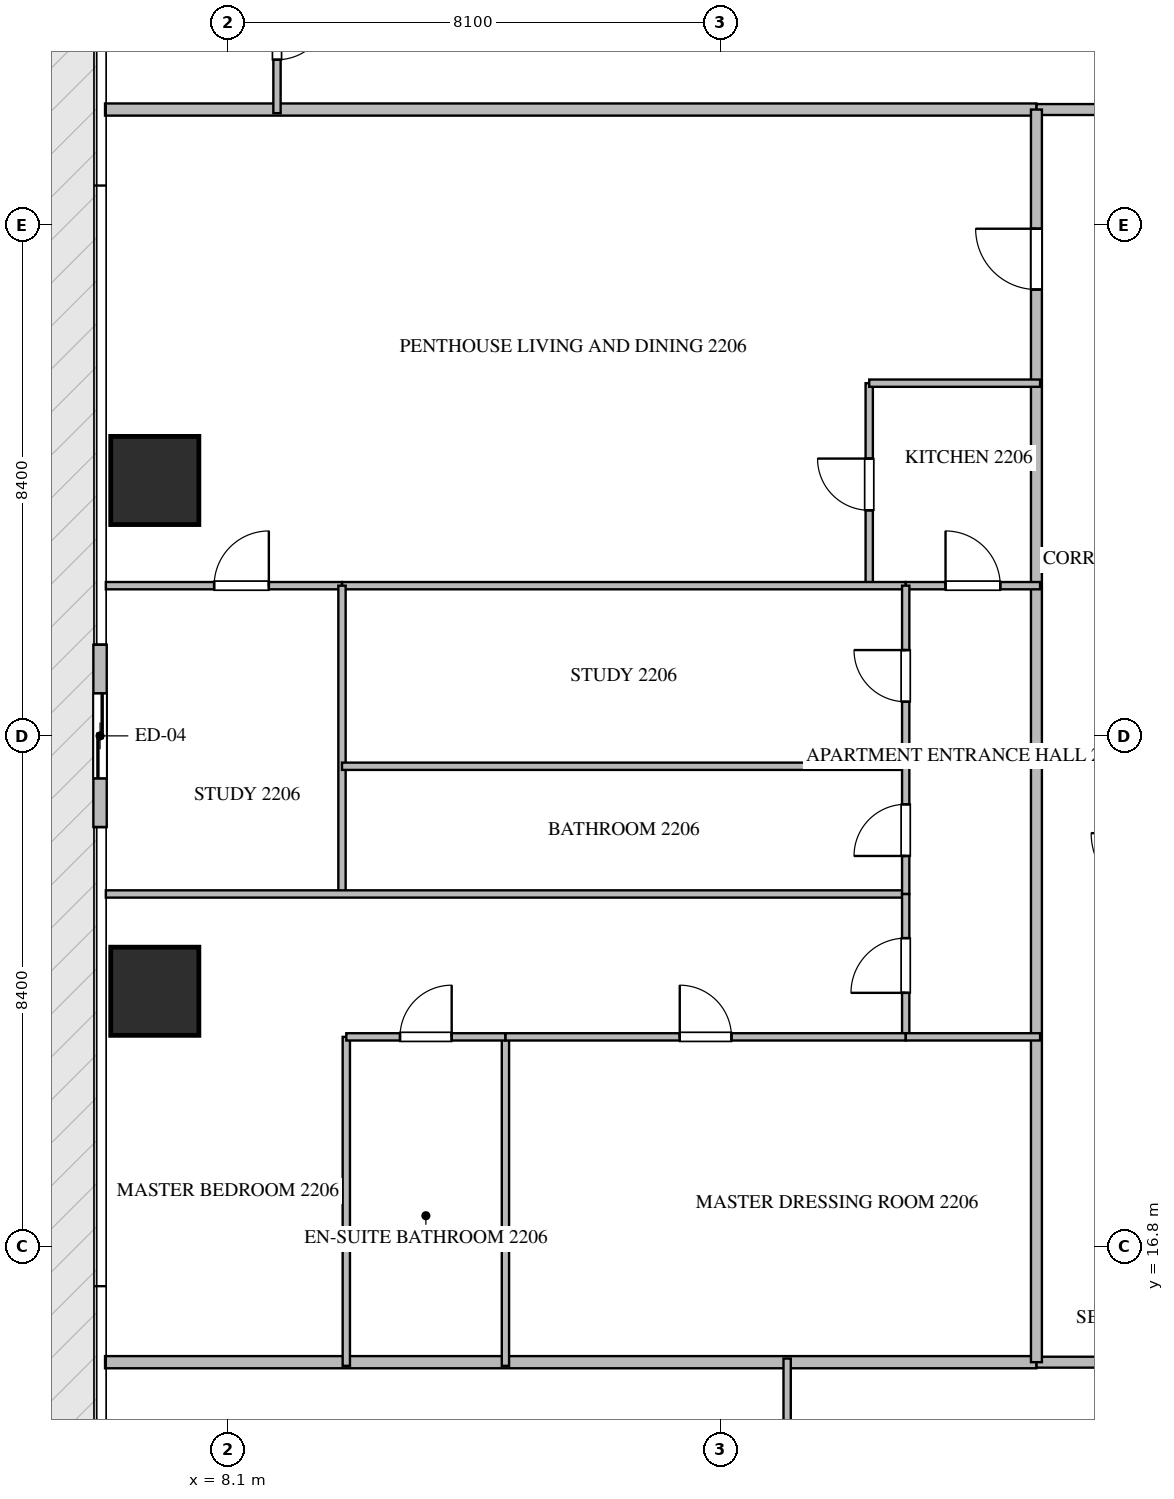
"""IFC4 building model, lengths in metres.
Left out: names, types, materials, properties, quantities, classifications, styles, units other than length and angle.
Written with IfcOpenShell. Run it as: python <this file> out.ifc"""

import sys

from ifc_helpers import new_model, si_unit, direction, frame, frame_2d, origin, origin_2d, place, context, subcontext, project, spatial, rectangle, extrude, source, transform, mapped, element, fill, save


model = new_model("IFC4")
c1 = context("Model", 3, precision=1e-05, world=origin(), true_north=direction((0.0, 1.0)))
c2 = subcontext(c1, "Body", "Model", "MODEL_VIEW")
j1 = project(units=[si_unit("LENGTHUNIT", "METRE"), si_unit("PLANEANGLEUNIT", "RADIAN")], contexts=[c1])
p1 = place(None, origin())
s1 = spatial("IfcSite", under=j1, at=p1, CompositionType="ELEMENT")
p2 = place(p1, origin())
s2 = spatial("IfcBuilding", under=s1, at=p2, CompositionType="ELEMENT")
p3 = place(p2, frame((0.0, 0.0, 90.45)))
s3 = spatial("IfcBuildingStorey", under=s2, at=p3, CompositionType="ELEMENT", Elevation=90.45)
m1 = source(origin(), c2, "Body", "SweptSolid", [
    extrude(rectangle(XDim=1.45, YDim=1.45, at=origin_2d()), origin(), (0.0, 0.0, 1.0), 3.75),
])
for number, where, z_axis, x_axis in (
    (1, (6.9, 21.0, -0.26), (0.0, 0.0, 1.0), (1.0, 0.0, 0.0)),
    (2, (6.9, 29.4, -0.26), (0.0, 0.0, 1.0), (1.0, 0.0, 0.0)),
):
    element("IfcColumn", number, at=place(p3, frame(where, z_axis=z_axis, x_axis=x_axis)), inside=s3, PredefinedType="COLUMN", context=c2, shape_type="MappedRepresentation", body=[
        mapped(m1, transform((0.0, 0.0, 0.0), scale=1.0)),
    ])
p4 = place(p3, frame((6.0, 26.7, 0.0), z_axis=(0.0, 0.0, 1.0), x_axis=(0.0, -1.0, 0.0)))
e3 = element("IfcWall", 3, at=p4, inside=s3, PredefinedType="ELEMENTEDWALL", context=c2, shape_type="SweptSolid", body=[
    extrude(rectangle(XDim=3.0, YDim=0.22, at=frame_2d((1.5, 0.0))), origin(), (0.0, 0.0, 1.0), 3.475),
])
p5 = place(p4, frame((0.8, 0.0, 0.0)))
e4 = element("IfcOpeningElement", 4, at=p5, cuts=e3, PredefinedType="OPENING", context=c2, shape_type="SweptSolid", body=[
    extrude(rectangle(XDim=1.4, YDim=2.25, at=frame_2d((0.7, 1.125))), frame((0.0, 0.12, 0.0), z_axis=(0.0, -1.0, 0.0), x_axis=(1.0, 0.0, 0.0)), (0.0, 0.0, 1.0), 0.24),
])
for number, where, z_axis, x_axis in (
    (5, (6.082, 14.9, 0.0), (0.0, 0.0, 1.0), (1.0, 0.0, 0.0)),
    (6, (6.082, 35.5, 0.0), (0.0, 0.0, 1.0), (1.0, 0.0, 0.0)),
):
    element("IfcWall", number, at=place(p3, frame(where, z_axis=z_axis, x_axis=x_axis)), inside=s3, PredefinedType="PARTITIONING", context=c2, shape_type="SweptSolid", body=[
        extrude(rectangle(XDim=15.318, YDim=0.2, at=frame_2d((7.659, 0.0))), origin(), (0.0, 0.0, 1.0), 3.49),
    ])
p6 = place(p3, frame((21.402, 14.9, 0.0), z_axis=(0.0, 0.0, 1.0), x_axis=(1.0, 0.0, 0.0)))
e7 = element("IfcWall", 7, at=p6, inside=s3, PredefinedType="PARTITIONING", context=c2, shape_type="SweptSolid", body=[
    extrude(rectangle(XDim=21.996, YDim=0.18, at=frame_2d((10.998, 0.0))), origin(), (0.0, 0.0, 1.0), 3.49),
])
p7 = place(p6, frame((7.202, 0.0, 0.0)))
e8 = element("IfcOpeningElement", 8, at=p7, cuts=e7, PredefinedType="OPENING", context=c2, shape_type="SweptSolid", body=[
    extrude(rectangle(XDim=1.0, YDim=2.15, at=frame_2d((0.5, 1.075))), frame((0.0, 0.1, 0.0), z_axis=(0.0, -1.0, 0.0), x_axis=(1.0, 0.0, 0.0)), (0.0, 0.0, 1.0), 0.2),
])
p8 = place(p3, frame((21.402, 35.5, 0.0), z_axis=(0.0, 0.0, 1.0), x_axis=(1.0, 0.0, 0.0)))
e9 = element("IfcWall", 9, at=p8, inside=s3, PredefinedType="PARTITIONING", context=c2, shape_type="SweptSolid", body=[
    extrude(rectangle(XDim=21.996, YDim=0.18, at=frame_2d((10.998, 0.0))), origin(), (0.0, 0.0, 1.0), 3.49),
])
p9 = place(p8, frame((1.96, 0.0, 0.0)))
e10 = element("IfcOpeningElement", 10, at=p9, cuts=e9, PredefinedType="OPENING", context=c2, shape_type="SweptSolid", body=[
    extrude(rectangle(XDim=1.0, YDim=2.15, at=frame_2d((0.5, 1.075))), frame((0.0, 0.1, 0.0), z_axis=(0.0, -1.0, 0.0), x_axis=(1.0, 0.0, 0.0)), (0.0, 0.0, 1.0), 0.2),
])
p10 = place(p8, frame((5.249, 0.0, 0.0)))
e11 = element("IfcOpeningElement", 11, at=p10, cuts=e9, PredefinedType="OPENING", context=c2, shape_type="SweptSolid", body=[
    extrude(rectangle(XDim=1.0, YDim=2.15, at=frame_2d((0.5, 1.075))), frame((0.0, 0.1, 0.0), z_axis=(0.0, -1.0, 0.0), x_axis=(1.0, 0.0, 0.0)), (0.0, 0.0, 1.0), 0.2),
])
p11 = place(p8, frame((11.653, 0.0, 0.0)))
e12 = element("IfcOpeningElement", 12, at=p11, cuts=e9, PredefinedType="OPENING", context=c2, shape_type="SweptSolid", body=[
    extrude(rectangle(XDim=1.0, YDim=2.15, at=frame_2d((0.5, 1.075))), frame((0.0, 0.1, 0.0), z_axis=(0.0, -1.0, 0.0), x_axis=(1.0, 0.0, 0.0)), (0.0, 0.0, 1.0), 0.2),
])
p12 = place(p8, frame((18.896, 0.0, 0.0)))
e13 = element("IfcOpeningElement", 13, at=p12, cuts=e9, PredefinedType="OPENING", context=c2, shape_type="SweptSolid", body=[
    extrude(rectangle(XDim=1.0, YDim=2.15, at=frame_2d((0.5, 1.075))), frame((0.0, 0.1, 0.0), z_axis=(0.0, -1.0, 0.0), x_axis=(1.0, 0.0, 0.0)), (0.0, 0.0, 1.0), 0.2),
])
p13 = place(p3, frame((21.4, 14.9, 0.0), z_axis=(0.0, 0.0, 1.0), x_axis=(0.0, 1.0, 0.0)))
e14 = element("IfcWall", 14, at=p13, inside=s3, PredefinedType="PARTITIONING", context=c2, shape_type="SweptSolid", body=[
    extrude(rectangle(XDim=20.6, YDim=0.18, at=frame_2d((10.3, 0.0))), origin(), (0.0, 0.0, 1.0), 3.49),
])
p14 = place(p13, frame((17.64, 0.0, 0.0)))
e15 = element("IfcOpeningElement", 15, at=p14, cuts=e14, PredefinedType="OPENING", context=c2, shape_type="SweptSolid", body=[
    extrude(rectangle(XDim=1.0, YDim=2.15, at=frame_2d((0.5, 1.075))), frame((0.0, 0.1, 0.0), z_axis=(0.0, -1.0, 0.0), x_axis=(1.0, 0.0, 0.0)), (0.0, 0.0, 1.0), 0.2),
])
p15 = place(p3, frame((17.3, 12.752, 0.0), z_axis=(0.0, 0.0, 1.0), x_axis=(0.0, 1.0, 0.0)))
e16 = element("IfcWall", 16, at=p15, inside=s3, PredefinedType="PARTITIONING", context=c2, shape_type="SweptSolid", body=[
    extrude(rectangle(XDim=2.208, YDim=0.12, at=frame_2d((1.104, 0.0))), origin(), (0.0, 0.0, 1.0), 3.49),
])
p16 = place(p3, frame((8.91, 38.048, 0.0), z_axis=(0.0, 0.0, 1.0), x_axis=(0.0, -1.0, 0.0)))
e17 = element("IfcWall", 17, at=p16, inside=s3, PredefinedType="PARTITIONING", context=c2, shape_type="SweptSolid", body=[
    extrude(rectangle(XDim=2.608, YDim=0.12, at=frame_2d((1.304, 0.0))), origin(), (0.0, 0.0, 1.0), 3.49),
])
p17 = place(p16, frame((0.879, 0.0, 0.0)))
e18 = element("IfcOpeningElement", 18, at=p17, cuts=e17, PredefinedType="OPENING", context=c2, shape_type="SweptSolid", body=[
    extrude(rectangle(XDim=0.85, YDim=2.1, at=frame_2d((0.425, 1.05))), frame((0.0, 0.07, 0.0), z_axis=(0.0, -1.0, 0.0), x_axis=(1.0, 0.0, 0.0)), (0.0, 0.0, 1.0), 0.14),
])
p18 = place(p3, frame((18.65, 27.67, 0.0), z_axis=(0.0, 0.0, 1.0), x_axis=(0.0, 1.0, 0.0)))
e19 = element("IfcWall", 19, at=p18, inside=s3, PredefinedType="PARTITIONING", context=c2, shape_type="SweptSolid", body=[
    extrude(rectangle(XDim=3.33, YDim=0.12, at=frame_2d((1.665, 0.0))), origin(), (0.0, 0.0, 1.0), 3.49),
])
p19 = place(p18, frame((1.24, 0.0, 0.0)))
e20 = element("IfcOpeningElement", 20, at=p19, cuts=e19, PredefinedType="OPENING", context=c2, shape_type="SweptSolid", body=[
    extrude(rectangle(XDim=0.85, YDim=2.1, at=frame_2d((0.425, 1.05))), frame((0.0, 0.07, 0.0), z_axis=(0.0, -1.0, 0.0), x_axis=(1.0, 0.0, 0.0)), (0.0, 0.0, 1.0), 0.14),
])
p20 = place(p3, frame((18.65, 31.0, 0.0), z_axis=(0.0, 0.0, 1.0), x_axis=(1.0, 0.0, 0.0)))
e21 = element("IfcWall", 21, at=p20, inside=s3, PredefinedType="PARTITIONING", context=c2, shape_type="SweptSolid", body=[
    extrude(rectangle(XDim=2.81, YDim=0.12, at=frame_2d((1.405, 0.0))), origin(), (0.0, 0.0, 1.0), 3.49),
])
p21 = place(p3, frame((19.25, 27.67, 0.0), z_axis=(0.0, 0.0, 1.0), x_axis=(1.0, 0.0, 0.0)))
e22 = element("IfcWall", 22, at=p21, inside=s3, PredefinedType="PARTITIONING", context=c2, shape_type="SweptSolid", body=[
    extrude(rectangle(XDim=2.21, YDim=0.12, at=frame_2d((1.105, 0.0))), origin(), (0.0, 0.0, 1.0), 3.49),
])
p22 = place(p21, frame((0.655, 0.0, 0.0)))
e23 = element("IfcOpeningElement", 23, at=p22, cuts=e22, PredefinedType="OPENING", context=c2, shape_type="SweptSolid", body=[
    extrude(rectangle(XDim=0.9, YDim=2.1, at=frame_2d((0.45, 1.05))), frame((0.0, 0.07, 0.0), z_axis=(0.0, -1.0, 0.0), x_axis=(1.0, 0.0, 0.0)), (0.0, 0.0, 1.0), 0.14),
])
p23 = place(p3, frame((6.095, 27.67, 0.0), z_axis=(0.0, 0.0, 1.0), x_axis=(1.0, 0.0, 0.0)))
e24 = element("IfcWall", 24, at=p23, inside=s3, PredefinedType="PARTITIONING", context=c2, shape_type="SweptSolid", body=[
    extrude(rectangle(XDim=3.884, YDim=0.12, at=frame_2d((1.942, 0.0))), origin(), (0.0, 0.0, 1.0), 3.49),
])
p24 = place(p23, frame((1.781, 0.0, 0.0)))
e25 = element("IfcOpeningElement", 25, at=p24, cuts=e24, PredefinedType="OPENING", context=c2, shape_type="SweptSolid", body=[
    extrude(rectangle(XDim=0.9, YDim=2.1, at=frame_2d((0.45, 1.05))), frame((0.0, 0.07, 0.0), z_axis=(0.0, -1.0, 0.0), x_axis=(1.0, 0.0, 0.0)), (0.0, 0.0, 1.0), 0.14),
])
p25 = place(p3, frame((9.981, 27.67, 0.0), z_axis=(0.0, 0.0, 1.0), x_axis=(1.0, 0.0, 0.0)))
e26 = element("IfcWall", 26, at=p25, inside=s3, PredefinedType="PARTITIONING", context=c2, shape_type="SweptSolid", body=[
    extrude(rectangle(XDim=9.267, YDim=0.12, at=frame_2d((4.634, 0.0))), origin(), (0.0, 0.0, 1.0), 3.49),
])
p26 = place(p3, frame((9.979, 22.6, 0.0), z_axis=(0.0, 0.0, 1.0), x_axis=(0.0, 1.0, 0.0)))
e27 = element("IfcWall", 27, at=p26, inside=s3, PredefinedType="PARTITIONING", context=c2, shape_type="SweptSolid", body=[
    extrude(rectangle(XDim=5.07, YDim=0.12, at=frame_2d((2.535, 0.0))), origin(), (0.0, 0.0, 1.0), 3.49),
])
p27 = place(p3, frame((6.095, 22.6, 0.0), z_axis=(0.0, 0.0, 1.0), x_axis=(1.0, 0.0, 0.0)))
e28 = element("IfcWall", 28, at=p27, inside=s3, PredefinedType="PARTITIONING", context=c2, shape_type="SweptSolid", body=[
    extrude(rectangle(XDim=13.155, YDim=0.12, at=frame_2d((6.578, 0.0))), origin(), (0.0, 0.0, 1.0), 3.49),
])
p28 = place(p3, frame((9.979, 24.7, 0.0), z_axis=(0.0, 0.0, 1.0), x_axis=(1.0, 0.0, 0.0)))
e29 = element("IfcWall", 29, at=p28, inside=s3, PredefinedType="PARTITIONING", context=c2, shape_type="SweptSolid", body=[
    extrude(rectangle(XDim=9.271, YDim=0.12, at=frame_2d((4.635, 0.0))), origin(), (0.0, 0.0, 1.0), 3.49),
])
p29 = place(p3, frame((19.25, 22.6, 0.0), z_axis=(0.0, 0.0, 1.0), x_axis=(0.0, 1.0, 0.0)))
e30 = element("IfcWall", 30, at=p29, inside=s3, PredefinedType="PARTITIONING", context=c2, shape_type="SweptSolid", body=[
    extrude(rectangle(XDim=2.1, YDim=0.12, at=frame_2d((1.05, 0.0))), origin(), (0.0, 0.0, 1.0), 3.49),
])
p30 = place(p29, frame((0.625, 0.0, 0.0)))
e31 = element("IfcOpeningElement", 31, at=p30, cuts=e30, PredefinedType="OPENING", context=c2, shape_type="SweptSolid", body=[
    extrude(rectangle(XDim=0.85, YDim=2.1, at=frame_2d((0.425, 1.05))), frame((0.0, 0.07, 0.0), z_axis=(0.0, -1.0, 0.0), x_axis=(1.0, 0.0, 0.0)), (0.0, 0.0, 1.0), 0.14),
])
p31 = place(p3, frame((19.25, 24.702, 0.0), z_axis=(0.0, 0.0, 1.0), x_axis=(0.0, 1.0, 0.0)))
e32 = element("IfcWall", 32, at=p31, inside=s3, PredefinedType="PARTITIONING", context=c2, shape_type="SweptSolid", body=[
    extrude(rectangle(XDim=2.968, YDim=0.12, at=frame_2d((1.484, 0.0))), origin(), (0.0, 0.0, 1.0), 3.49),
])
p32 = place(p31, frame((1.059, 0.0, 0.0)))
e33 = element("IfcOpeningElement", 33, at=p32, cuts=e32, PredefinedType="OPENING", context=c2, shape_type="SweptSolid", body=[
    extrude(rectangle(XDim=0.85, YDim=2.1, at=frame_2d((0.425, 1.05))), frame((0.0, 0.07, 0.0), z_axis=(0.0, -1.0, 0.0), x_axis=(1.0, 0.0, 0.0)), (0.0, 0.0, 1.0), 0.14),
])
p33 = place(p3, frame((19.25, 20.25, 0.0), z_axis=(0.0, 0.0, 1.0), x_axis=(0.0, 1.0, 0.0)))
e34 = element("IfcWall", 34, at=p33, inside=s3, PredefinedType="PARTITIONING", context=c2, shape_type="SweptSolid", body=[
    extrude(rectangle(XDim=2.348, YDim=0.12, at=frame_2d((1.174, 0.0))), origin(), (0.0, 0.0, 1.0), 3.49),
])
p34 = place(p33, frame((0.724, 0.0, 0.0)))
e35 = element("IfcOpeningElement", 35, at=p34, cuts=e34, PredefinedType="OPENING", context=c2, shape_type="SweptSolid", body=[
    extrude(rectangle(XDim=0.9, YDim=2.1, at=frame_2d((0.45, 1.05))), frame((0.0, 0.07, 0.0), z_axis=(0.0, -1.0, 0.0), x_axis=(1.0, 0.0, 0.0)), (0.0, 0.0, 1.0), 0.14),
])
for number, where, z_axis, x_axis in (
    (36, (10.05, 14.84, 0.0), (0.0, 0.0, 1.0), (0.0, 1.0, 0.0)),
    (37, (12.667, 14.84, 0.0), (0.0, 0.0, 1.0), (0.0, 1.0, 0.0)),
):
    element("IfcWall", number, at=place(p3, frame(where, z_axis=z_axis, x_axis=x_axis)), inside=s3, PredefinedType="PARTITIONING", context=c2, shape_type="SweptSolid", body=[
        extrude(rectangle(XDim=5.41, YDim=0.12, at=frame_2d((2.705, 0.0))), origin(), (0.0, 0.0, 1.0), 3.49),
    ])
p35 = place(p3, frame((10.05, 20.25, 0.0), z_axis=(0.0, 0.0, 1.0), x_axis=(1.0, 0.0, 0.0)))
e38 = element("IfcWall", 38, at=p35, inside=s3, PredefinedType="PARTITIONING", context=c2, shape_type="SweptSolid", body=[
    extrude(rectangle(XDim=2.617, YDim=0.12, at=frame_2d((1.309, 0.0))), origin(), (0.0, 0.0, 1.0), 3.49),
])
p36 = place(p35, frame((0.883, 0.0, 0.0)))
e39 = element("IfcOpeningElement", 39, at=p36, cuts=e38, PredefinedType="OPENING", context=c2, shape_type="SweptSolid", body=[
    extrude(rectangle(XDim=0.85, YDim=2.1, at=frame_2d((0.425, 1.05))), frame((0.0, 0.07, 0.0), z_axis=(0.0, -1.0, 0.0), x_axis=(1.0, 0.0, 0.0)), (0.0, 0.0, 1.0), 0.14),
])
p37 = place(p3, frame((12.669, 20.25, 0.0), z_axis=(0.0, 0.0, 1.0), x_axis=(1.0, 0.0, 0.0)))
e40 = element("IfcWall", 40, at=p37, inside=s3, PredefinedType="PARTITIONING", context=c2, shape_type="SweptSolid", body=[
    extrude(rectangle(XDim=6.581, YDim=0.12, at=frame_2d((3.291, 0.0))), origin(), (0.0, 0.0, 1.0), 3.49),
])
p38 = place(p37, frame((2.865, 0.0, 0.0)))
e41 = element("IfcOpeningElement", 41, at=p38, cuts=e40, PredefinedType="OPENING", context=c2, shape_type="SweptSolid", body=[
    extrude(rectangle(XDim=0.85, YDim=2.1, at=frame_2d((0.425, 1.05))), frame((0.0, 0.07, 0.0), z_axis=(0.0, -1.0, 0.0), x_axis=(1.0, 0.0, 0.0)), (0.0, 0.0, 1.0), 0.14),
])
p39 = place(p3, frame((19.252, 20.25, 0.0), z_axis=(0.0, 0.0, 1.0), x_axis=(1.0, 0.0, 0.0)))
e42 = element("IfcWall", 42, at=p39, inside=s3, PredefinedType="PARTITIONING", context=c2, shape_type="SweptSolid", body=[
    extrude(rectangle(XDim=2.208, YDim=0.12, at=frame_2d((1.104, 0.0))), origin(), (0.0, 0.0, 1.0), 3.49),
])
m2 = source(origin(), c2, "Body", "SweptSolid", [
    extrude(rectangle(XDim=1.4, YDim=2.25, at=frame_2d((0.7, 1.125))), frame((0.0, 0.025, 0.0), z_axis=(0.0, -1.0, 0.0), x_axis=(1.0, 0.0, 0.0)), (0.0, 0.0, 1.0), 0.05),
])
p40 = place(p5, origin())
e43 = element("IfcDoor", 43, at=p40, inside=s3, OperationType="SLIDING_TO_LEFT", PredefinedType="DOOR", context=c2, shape_type="MappedRepresentation", body=[
    mapped(m2, transform((0.0, 0.0, 0.0), scale=1.0)),
])
fill(e4, e43)
m3 = source(origin(), c2, "Body", "SweptSolid", [
    extrude(rectangle(XDim=1.0, YDim=2.15, at=frame_2d((0.5, 1.075))), frame((0.0, 0.025, 0.0), z_axis=(0.0, -1.0, 0.0), x_axis=(1.0, 0.0, 0.0)), (0.0, 0.0, 1.0), 0.05),
])
p41 = place(p14, origin())
e44 = element("IfcDoor", 44, at=p41, inside=s3, OperationType="SINGLE_SWING_RIGHT", PredefinedType="DOOR", context=c2, shape_type="MappedRepresentation", body=[
    mapped(m3, transform((0.0, 0.0, 0.0), scale=1.0)),
])
fill(e15, e44)
m4 = source(origin(), c2, "Body", "SweptSolid", [
    extrude(rectangle(XDim=0.85, YDim=2.1, at=frame_2d((0.425, 1.05))), frame((0.0, 0.025, 0.0), z_axis=(0.0, -1.0, 0.0), x_axis=(1.0, 0.0, 0.0)), (0.0, 0.0, 1.0), 0.05),
])
p42 = place(p17, origin())
e45 = element("IfcDoor", 45, at=p42, inside=s3, OperationType="SINGLE_SWING_LEFT", PredefinedType="DOOR", context=c2, shape_type="MappedRepresentation", body=[
    mapped(m4, transform((0.0, 0.0, 0.0), scale=1.0)),
])
fill(e18, e45)
p43 = place(p19, origin())
e46 = element("IfcDoor", 46, at=p43, inside=s3, OperationType="SINGLE_SWING_RIGHT", PredefinedType="DOOR", context=c2, shape_type="MappedRepresentation", body=[
    mapped(m4, transform((0.0, 0.0, 0.0), scale=1.0)),
])
fill(e20, e46)
m5 = source(origin(), c2, "Body", "SweptSolid", [
    extrude(rectangle(XDim=0.9, YDim=2.1, at=frame_2d((0.45, 1.05))), frame((0.0, 0.025, 0.0), z_axis=(0.0, -1.0, 0.0), x_axis=(1.0, 0.0, 0.0)), (0.0, 0.0, 1.0), 0.05),
])
p44 = place(p22, origin())
e47 = element("IfcDoor", 47, at=p44, inside=s3, OperationType="SINGLE_SWING_LEFT", PredefinedType="DOOR", context=c2, shape_type="MappedRepresentation", body=[
    mapped(m5, transform((0.0, 0.0, 0.0), scale=1.0)),
])
fill(e23, e47)
p45 = place(p24, origin())
e48 = element("IfcDoor", 48, at=p45, inside=s3, OperationType="SINGLE_SWING_RIGHT", PredefinedType="DOOR", context=c2, shape_type="MappedRepresentation", body=[
    mapped(m5, transform((0.0, 0.0, 0.0), scale=1.0)),
])
fill(e25, e48)
p46 = place(p30, origin())
e49 = element("IfcDoor", 49, at=p46, inside=s3, OperationType="SINGLE_SWING_LEFT", PredefinedType="DOOR", context=c2, shape_type="MappedRepresentation", body=[
    mapped(m4, transform((0.0, 0.0, 0.0), scale=1.0)),
])
fill(e31, e49)
p47 = place(p32, origin())
e50 = element("IfcDoor", 50, at=p47, inside=s3, OperationType="SINGLE_SWING_RIGHT", PredefinedType="DOOR", context=c2, shape_type="MappedRepresentation", body=[
    mapped(m4, transform((0.0, 0.0, 0.0), scale=1.0)),
])
fill(e33, e50)
p48 = place(p34, origin())
e51 = element("IfcDoor", 51, at=p48, inside=s3, OperationType="SINGLE_SWING_LEFT", PredefinedType="DOOR", context=c2, shape_type="MappedRepresentation", body=[
    mapped(m5, transform((0.0, 0.0, 0.0), scale=1.0)),
])
fill(e35, e51)
p49 = place(p36, origin())
e52 = element("IfcDoor", 52, at=p49, inside=s3, OperationType="SINGLE_SWING_RIGHT", PredefinedType="DOOR", context=c2, shape_type="MappedRepresentation", body=[
    mapped(m4, transform((0.0, 0.0, 0.0), scale=1.0)),
])
fill(e39, e52)
p50 = place(p38, origin())
e53 = element("IfcDoor", 53, at=p50, inside=s3, OperationType="SINGLE_SWING_LEFT", PredefinedType="DOOR", context=c2, shape_type="MappedRepresentation", body=[
    mapped(m4, transform((0.0, 0.0, 0.0), scale=1.0)),
])
fill(e41, e53)
save(model, sys.argv[1])
